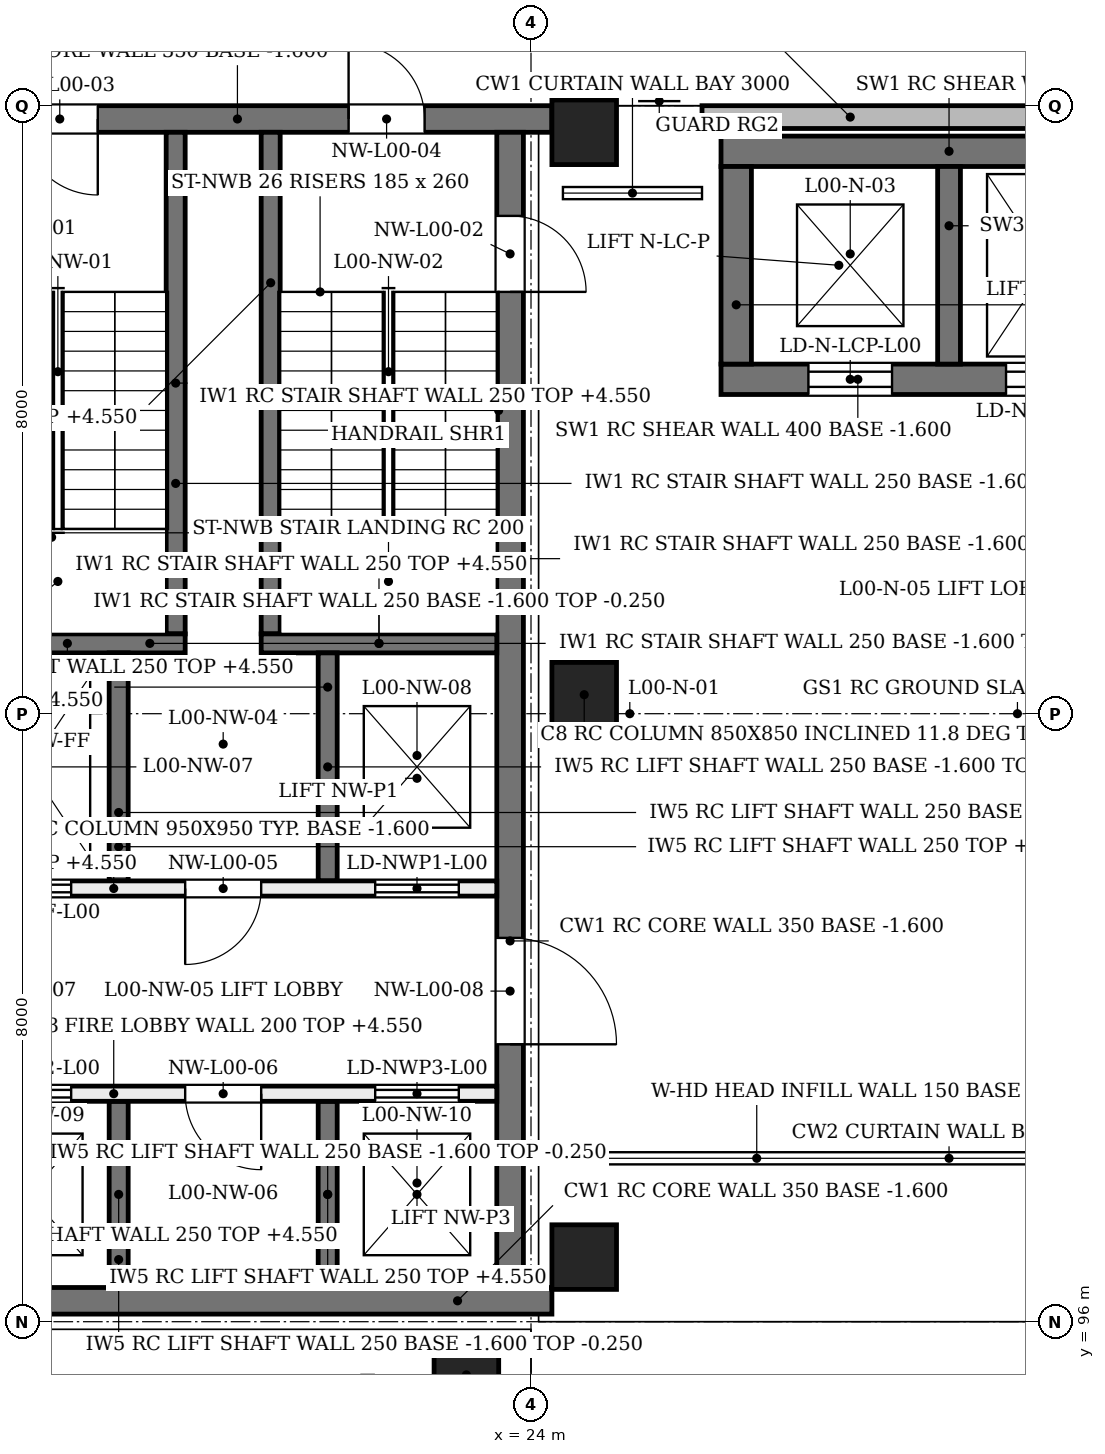
"""IFC4 building model, lengths in metres.
Left out: names, types, materials, properties, quantities, classifications, styles, units other than length and angle.
Written with IfcOpenShell. Run it as: python <this file> out.ifc"""

import sys

from ifc_helpers import new_model, si_unit, direction, frame, frame_2d, origin, origin_2d, place, context, subcontext, project, spatial, rectangle, extrude, element, fill, save


model = new_model("IFC4")
c1 = context("Model", 3, precision=1e-05, world=origin(), true_north=direction((0.0, 1.0)))
c2 = subcontext(c1, "Body", "Model", "MODEL_VIEW")
j1 = project(units=[si_unit("LENGTHUNIT", "METRE"), si_unit("PLANEANGLEUNIT", "RADIAN")], contexts=[c1])
p1 = place(None, origin())
s1 = spatial("IfcSite", under=j1, at=p1, CompositionType="ELEMENT")
p2 = place(p1, origin())
s2 = spatial("IfcBuilding", under=s1, at=p2, CompositionType="ELEMENT")
p3 = place(p2, origin())
s3 = spatial("IfcBuildingStorey", under=s2, at=p3, CompositionType="ELEMENT", Elevation=0.0)
p4 = place(p3, frame((26.5, 108.4, -1.6), z_axis=(0.0, 0.0, 1.0), x_axis=(1.0, 0.0, 0.0)))
e1 = element("IfcWall", 1, at=p4, inside=s3, PredefinedType="SHEAR", context=c2, shape_type="SweptSolid", body=[
    extrude(rectangle(XDim=6.0, YDim=0.4, at=frame_2d((3.0, 0.0))), origin(), (0.0, 0.0, 1.0), 6.18),
])
p5 = place(p4, frame((1.15, 0.0, 1.6)))
e2 = element("IfcOpeningElement", 2, at=p5, cuts=e1, PredefinedType="OPENING", context=c2, shape_type="SweptSolid", body=[
    extrude(rectangle(XDim=1.1, YDim=2.1, at=frame_2d((0.55, 1.05))), frame((0.0, 0.21, 0.0), z_axis=(0.0, -1.0, 0.0), x_axis=(1.0, 0.0, 0.0)), (0.0, 0.0, 1.0), 0.42),
])
p6 = place(p4, frame((3.75, 0.0, 1.6)))
e3 = element("IfcOpeningElement", 3, at=p6, cuts=e1, PredefinedType="OPENING", context=c2, shape_type="SweptSolid", body=[
    extrude(rectangle(XDim=1.1, YDim=2.1, at=frame_2d((0.55, 1.05))), frame((0.0, 0.21, 0.0), z_axis=(0.0, -1.0, 0.0), x_axis=(1.0, 0.0, 0.0)), (0.0, 0.0, 1.0), 0.42),
])
p7 = place(p3, frame((26.5, 111.4, -1.6), z_axis=(0.0, 0.0, 1.0), x_axis=(1.0, 0.0, 0.0)))
e4 = element("IfcWall", 4, at=p7, inside=s3, PredefinedType="SHEAR", context=c2, shape_type="SweptSolid", body=[
    extrude(rectangle(XDim=6.0, YDim=0.4, at=frame_2d((3.0, 0.0))), origin(), (0.0, 0.0, 1.0), 6.18),
])
p8 = place(p3, frame((26.7, 108.6, -1.6), z_axis=(0.0, 0.0, 1.0), x_axis=(0.0, 1.0, 0.0)))
e5 = element("IfcWall", 5, at=p8, inside=s3, PredefinedType="SHEAR", context=c2, shape_type="SweptSolid", body=[
    extrude(rectangle(XDim=2.6, YDim=0.4, at=frame_2d((1.3, 0.0))), origin(), (0.0, 0.0, 1.0), 6.18),
])
p9 = place(p3, frame((29.5, 108.6, -1.6), z_axis=(0.0, 0.0, 1.0), x_axis=(0.0, 1.0, 0.0)))
e6 = element("IfcWall", 6, at=p9, inside=s3, PredefinedType="SHEAR", context=c2, shape_type="SweptSolid", body=[
    extrude(rectangle(XDim=2.6, YDim=0.3, at=frame_2d((1.3, 0.0))), origin(), (0.0, 0.0, 1.0), 6.18),
])
p10 = place(p3, frame((16.0, 96.275, -1.6), z_axis=(0.0, 0.0, 1.0), x_axis=(1.0, 0.0, 0.0)))
e7 = element("IfcWall", 7, at=p10, inside=s3, PredefinedType="SHEAR", context=c2, shape_type="SweptSolid", body=[
    extrude(rectangle(XDim=8.275, YDim=0.35, at=frame_2d((4.137, 0.0))), origin(), (0.0, 0.0, 1.0), 6.18),
])
p11 = place(p3, frame((16.0, 111.825, -1.6), z_axis=(0.0, 0.0, 1.0), x_axis=(1.0, 0.0, 0.0)))
e8 = element("IfcWall", 8, at=p11, inside=s3, PredefinedType="SHEAR", context=c2, shape_type="SweptSolid", body=[
    extrude(rectangle(XDim=8.275, YDim=0.35, at=frame_2d((4.137, 0.0))), origin(), (0.0, 0.0, 1.0), 6.18),
])
p12 = place(p11, frame((1.3, 0.0, 1.6)))
e9 = element("IfcOpeningElement", 9, at=p12, cuts=e8, PredefinedType="OPENING", context=c2, shape_type="SweptSolid", body=[
    extrude(rectangle(XDim=1.0, YDim=2.1, at=frame_2d((0.5, 1.05))), frame((0.0, 0.185, 0.0), z_axis=(0.0, -1.0, 0.0), x_axis=(1.0, 0.0, 0.0)), (0.0, 0.0, 1.0), 0.37),
])
p13 = place(p11, frame((5.6, 0.0, 1.6)))
e10 = element("IfcOpeningElement", 10, at=p13, cuts=e8, PredefinedType="OPENING", context=c2, shape_type="SweptSolid", body=[
    extrude(rectangle(XDim=1.0, YDim=2.1, at=frame_2d((0.5, 1.05))), frame((0.0, 0.185, 0.0), z_axis=(0.0, -1.0, 0.0), x_axis=(1.0, 0.0, 0.0)), (0.0, 0.0, 1.0), 0.37),
])
p14 = place(p3, frame((23.725, 96.45, -1.6), z_axis=(0.0, 0.0, 1.0), x_axis=(0.0, 1.0, 0.0)))
e11 = element("IfcWall", 11, at=p14, inside=s3, PredefinedType="SHEAR", context=c2, shape_type="SweptSolid", body=[
    extrude(rectangle(XDim=15.2, YDim=0.35, at=frame_2d((7.6, 0.0))), origin(), (0.0, 0.0, 1.0), 6.18),
])
p15 = place(p14, frame((13.1, 0.0, 1.6)))
e12 = element("IfcOpeningElement", 12, at=p15, cuts=e11, PredefinedType="OPENING", context=c2, shape_type="SweptSolid", body=[
    extrude(rectangle(XDim=1.0, YDim=2.1, at=frame_2d((0.5, 1.05))), frame((0.0, 0.185, 0.0), z_axis=(0.0, -1.0, 0.0), x_axis=(1.0, 0.0, 0.0)), (0.0, 0.0, 1.0), 0.37),
])
p16 = place(p14, frame((3.2, 0.0, 1.6)))
e13 = element("IfcOpeningElement", 13, at=p16, cuts=e11, PredefinedType="OPENING", context=c2, shape_type="SweptSolid", body=[
    extrude(rectangle(XDim=1.4, YDim=2.1, at=frame_2d((0.7, 1.05))), frame((0.0, 0.185, 0.0), z_axis=(0.0, -1.0, 0.0), x_axis=(1.0, 0.0, 0.0)), (0.0, 0.0, 1.0), 0.37),
])
for number, where, z_axis, x_axis in (
    (14, (24.7, 96.267, -1.6), (0.0, 0.204, 0.979), (-1.0, 0.0, 0.0)),
    (15, (24.7, 103.667, -1.6), (0.0, 0.204, 0.979), (-1.0, 0.0, 0.0)),
    (16, (24.7, 111.067, -1.6), (0.0, 0.204, 0.979), (-1.0, 0.0, 0.0)),
    (17, (23.733, 95.3, -1.6), (-0.204, 0.0, 0.979), (0.0, -1.0, 0.0)),
):
    element("IfcColumn", number, at=place(p3, frame(where, z_axis=z_axis, x_axis=x_axis)), inside=s3, PredefinedType="COLUMN", context=c2, shape_type="SweptSolid", body=[
        extrude(rectangle(XDim=0.85, YDim=0.85, at=origin_2d()), origin(), (0.0, 0.0, 1.0), 6.538),
    ])
p17 = place(p3, frame((26.25, 111.85, 0.0), z_axis=(0.0, 0.0, 1.0), x_axis=(1.0, 0.0, 0.0)))
e18 = element("IfcWall", 18, at=p17, inside=s3, PredefinedType="SOLIDWALL", context=c2, shape_type="SweptSolid", body=[
    extrude(rectangle(XDim=6.5, YDim=0.3, at=frame_2d((3.25, 0.0))), origin(), (0.0, 0.0, 1.0), 3.9),
])
p18 = place(p3, frame((24.9, 98.15, 4.1), z_axis=(0.0, 0.0, 1.0), x_axis=(1.0, 0.0, 0.0)))
e19 = element("IfcWall", 19, at=p18, inside=s3, PredefinedType="SOLIDWALL", context=c2, shape_type="SweptSolid", body=[
    extrude(rectangle(XDim=6.9, YDim=0.15, at=frame_2d((3.45, 0.0))), origin(), (0.0, 0.0, 1.0), 0.48),
])
p19 = place(p3, frame((19.325, 111.65, 0.0), z_axis=(0.0, 0.0, 1.0), x_axis=(0.0, -1.0, 0.0)))
e20 = element("IfcWall", 20, at=p19, inside=s3, PredefinedType="SOLIDWALL", context=c2, shape_type="SweptSolid", body=[
    extrude(rectangle(XDim=6.6, YDim=0.25, at=frame_2d((3.3, 0.0))), origin(), (0.0, 0.0, 1.0), 4.55),
])
p20 = place(p3, frame((19.325, 111.65, -1.6), z_axis=(0.0, 0.0, 1.0), x_axis=(0.0, -1.0, 0.0)))
e21 = element("IfcWall", 21, at=p20, inside=s3, PredefinedType="SOLIDWALL", context=c2, shape_type="SweptSolid", body=[
    extrude(rectangle(XDim=6.6, YDim=0.25, at=frame_2d((3.3, 0.0))), origin(), (0.0, 0.0, 1.0), 1.35),
])
p21 = place(p3, frame((20.575, 111.65, 0.0), z_axis=(0.0, 0.0, 1.0), x_axis=(0.0, -1.0, 0.0)))
e22 = element("IfcWall", 22, at=p21, inside=s3, PredefinedType="SOLIDWALL", context=c2, shape_type="SweptSolid", body=[
    extrude(rectangle(XDim=6.6, YDim=0.25, at=frame_2d((3.3, 0.0))), origin(), (0.0, 0.0, 1.0), 4.55),
])
p22 = place(p3, frame((20.575, 111.65, -1.6), z_axis=(0.0, 0.0, 1.0), x_axis=(0.0, -1.0, 0.0)))
e23 = element("IfcWall", 23, at=p22, inside=s3, PredefinedType="SOLIDWALL", context=c2, shape_type="SweptSolid", body=[
    extrude(rectangle(XDim=6.6, YDim=0.25, at=frame_2d((3.3, 0.0))), origin(), (0.0, 0.0, 1.0), 1.35),
])
p23 = place(p3, frame((16.35, 104.925, 0.0), z_axis=(0.0, 0.0, 1.0), x_axis=(1.0, 0.0, 0.0)))
e24 = element("IfcWall", 24, at=p23, inside=s3, PredefinedType="SOLIDWALL", context=c2, shape_type="SweptSolid", body=[
    extrude(rectangle(XDim=3.1, YDim=0.25, at=frame_2d((1.55, 0.0))), origin(), (0.0, 0.0, 1.0), 4.55),
])
p24 = place(p3, frame((16.35, 104.925, -1.6), z_axis=(0.0, 0.0, 1.0), x_axis=(1.0, 0.0, 0.0)))
e25 = element("IfcWall", 25, at=p24, inside=s3, PredefinedType="SOLIDWALL", context=c2, shape_type="SweptSolid", body=[
    extrude(rectangle(XDim=3.1, YDim=0.25, at=frame_2d((1.55, 0.0))), origin(), (0.0, 0.0, 1.0), 1.35),
])
p25 = place(p3, frame((20.45, 104.925, 0.0), z_axis=(0.0, 0.0, 1.0), x_axis=(1.0, 0.0, 0.0)))
e26 = element("IfcWall", 26, at=p25, inside=s3, PredefinedType="SOLIDWALL", context=c2, shape_type="SweptSolid", body=[
    extrude(rectangle(XDim=3.1, YDim=0.25, at=frame_2d((1.55, 0.0))), origin(), (0.0, 0.0, 1.0), 4.55),
])
p26 = place(p3, frame((20.45, 104.925, -1.6), z_axis=(0.0, 0.0, 1.0), x_axis=(1.0, 0.0, 0.0)))
e27 = element("IfcWall", 27, at=p26, inside=s3, PredefinedType="SOLIDWALL", context=c2, shape_type="SweptSolid", body=[
    extrude(rectangle(XDim=3.1, YDim=0.25, at=frame_2d((1.55, 0.0))), origin(), (0.0, 0.0, 1.0), 1.35),
])
p27 = place(p3, frame((18.575, 104.8, 0.0), z_axis=(0.0, 0.0, 1.0), x_axis=(0.0, -1.0, 0.0)))
e28 = element("IfcWall", 28, at=p27, inside=s3, PredefinedType="SOLIDWALL", context=c2, shape_type="SweptSolid", body=[
    extrude(rectangle(XDim=3.0, YDim=0.25, at=frame_2d((1.5, 0.0))), origin(), (0.0, 0.0, 1.0), 4.55),
])
p28 = place(p3, frame((18.575, 104.8, -1.6), z_axis=(0.0, 0.0, 1.0), x_axis=(0.0, -1.0, 0.0)))
e29 = element("IfcWall", 29, at=p28, inside=s3, PredefinedType="SOLIDWALL", context=c2, shape_type="SweptSolid", body=[
    extrude(rectangle(XDim=3.0, YDim=0.25, at=frame_2d((1.5, 0.0))), origin(), (0.0, 0.0, 1.0), 1.35),
])
p29 = place(p3, frame((18.575, 98.9, 0.0), z_axis=(0.0, 0.0, 1.0), x_axis=(0.0, -1.0, 0.0)))
e30 = element("IfcWall", 30, at=p29, inside=s3, PredefinedType="SOLIDWALL", context=c2, shape_type="SweptSolid", body=[
    extrude(rectangle(XDim=2.45, YDim=0.25, at=frame_2d((1.225, 0.0))), origin(), (0.0, 0.0, 1.0), 4.55),
])
p30 = place(p3, frame((18.575, 98.9, -1.6), z_axis=(0.0, 0.0, 1.0), x_axis=(0.0, -1.0, 0.0)))
e31 = element("IfcWall", 31, at=p30, inside=s3, PredefinedType="SOLIDWALL", context=c2, shape_type="SweptSolid", body=[
    extrude(rectangle(XDim=2.45, YDim=0.25, at=frame_2d((1.225, 0.0))), origin(), (0.0, 0.0, 1.0), 1.35),
])
p31 = place(p3, frame((21.325, 104.8, 0.0), z_axis=(0.0, 0.0, 1.0), x_axis=(0.0, -1.0, 0.0)))
e32 = element("IfcWall", 32, at=p31, inside=s3, PredefinedType="SOLIDWALL", context=c2, shape_type="SweptSolid", body=[
    extrude(rectangle(XDim=3.0, YDim=0.25, at=frame_2d((1.5, 0.0))), origin(), (0.0, 0.0, 1.0), 4.55),
])
p32 = place(p3, frame((21.325, 104.8, -1.6), z_axis=(0.0, 0.0, 1.0), x_axis=(0.0, -1.0, 0.0)))
e33 = element("IfcWall", 33, at=p32, inside=s3, PredefinedType="SOLIDWALL", context=c2, shape_type="SweptSolid", body=[
    extrude(rectangle(XDim=3.0, YDim=0.25, at=frame_2d((1.5, 0.0))), origin(), (0.0, 0.0, 1.0), 1.35),
])
p33 = place(p3, frame((21.325, 98.9, 0.0), z_axis=(0.0, 0.0, 1.0), x_axis=(0.0, -1.0, 0.0)))
e34 = element("IfcWall", 34, at=p33, inside=s3, PredefinedType="SOLIDWALL", context=c2, shape_type="SweptSolid", body=[
    extrude(rectangle(XDim=2.45, YDim=0.25, at=frame_2d((1.225, 0.0))), origin(), (0.0, 0.0, 1.0), 4.55),
])
p34 = place(p3, frame((21.325, 98.9, -1.6), z_axis=(0.0, 0.0, 1.0), x_axis=(0.0, -1.0, 0.0)))
e35 = element("IfcWall", 35, at=p34, inside=s3, PredefinedType="SOLIDWALL", context=c2, shape_type="SweptSolid", body=[
    extrude(rectangle(XDim=2.45, YDim=0.25, at=frame_2d((1.225, 0.0))), origin(), (0.0, 0.0, 1.0), 1.35),
])
p35 = place(p3, frame((16.35, 101.7, 0.0), z_axis=(0.0, 0.0, 1.0), x_axis=(1.0, 0.0, 0.0)))
e36 = element("IfcWall", 36, at=p35, inside=s3, PredefinedType="SOLIDWALL", context=c2, shape_type="SweptSolid", body=[
    extrude(rectangle(XDim=7.2, YDim=0.2, at=frame_2d((3.6, 0.0))), origin(), (0.0, 0.0, 1.0), 4.55),
])
p36 = place(p35, frame((0.5, 0.0, 0.0)))
e37 = element("IfcOpeningElement", 37, at=p36, cuts=e36, PredefinedType="OPENING", context=c2, shape_type="SweptSolid", body=[
    extrude(rectangle(XDim=1.1, YDim=2.1, at=frame_2d((0.55, 1.05))), frame((0.0, 0.11, 0.0), z_axis=(0.0, -1.0, 0.0), x_axis=(1.0, 0.0, 0.0)), (0.0, 0.0, 1.0), 0.22),
])
p37 = place(p35, frame((5.6, 0.0, 0.0)))
e38 = element("IfcOpeningElement", 38, at=p37, cuts=e36, PredefinedType="OPENING", context=c2, shape_type="SweptSolid", body=[
    extrude(rectangle(XDim=1.1, YDim=2.1, at=frame_2d((0.55, 1.05))), frame((0.0, 0.11, 0.0), z_axis=(0.0, -1.0, 0.0), x_axis=(1.0, 0.0, 0.0)), (0.0, 0.0, 1.0), 0.22),
])
p38 = place(p35, frame((3.1, 0.0, 0.0)))
e39 = element("IfcOpeningElement", 39, at=p38, cuts=e36, PredefinedType="OPENING", context=c2, shape_type="SweptSolid", body=[
    extrude(rectangle(XDim=1.0, YDim=2.1, at=frame_2d((0.5, 1.05))), frame((0.0, 0.11, 0.0), z_axis=(0.0, -1.0, 0.0), x_axis=(1.0, 0.0, 0.0)), (0.0, 0.0, 1.0), 0.22),
])
p39 = place(p3, frame((16.35, 99.0, 0.0), z_axis=(0.0, 0.0, 1.0), x_axis=(1.0, 0.0, 0.0)))
e40 = element("IfcWall", 40, at=p39, inside=s3, PredefinedType="SOLIDWALL", context=c2, shape_type="SweptSolid", body=[
    extrude(rectangle(XDim=7.2, YDim=0.2, at=frame_2d((3.6, 0.0))), origin(), (0.0, 0.0, 1.0), 4.55),
])
p40 = place(p39, frame((0.5, 0.0, 0.0)))
e41 = element("IfcOpeningElement", 41, at=p40, cuts=e40, PredefinedType="OPENING", context=c2, shape_type="SweptSolid", body=[
    extrude(rectangle(XDim=1.1, YDim=2.1, at=frame_2d((0.55, 1.05))), frame((0.0, 0.11, 0.0), z_axis=(0.0, -1.0, 0.0), x_axis=(1.0, 0.0, 0.0)), (0.0, 0.0, 1.0), 0.22),
])
p41 = place(p39, frame((5.6, 0.0, 0.0)))
e42 = element("IfcOpeningElement", 42, at=p41, cuts=e40, PredefinedType="OPENING", context=c2, shape_type="SweptSolid", body=[
    extrude(rectangle(XDim=1.1, YDim=2.1, at=frame_2d((0.55, 1.05))), frame((0.0, 0.11, 0.0), z_axis=(0.0, -1.0, 0.0), x_axis=(1.0, 0.0, 0.0)), (0.0, 0.0, 1.0), 0.22),
])
p42 = place(p39, frame((3.1, 0.0, 0.0)))
e43 = element("IfcOpeningElement", 43, at=p42, cuts=e40, PredefinedType="OPENING", context=c2, shape_type="SweptSolid", body=[
    extrude(rectangle(XDim=1.0, YDim=2.1, at=frame_2d((0.5, 1.05))), frame((0.0, 0.11, 0.0), z_axis=(0.0, -1.0, 0.0), x_axis=(1.0, 0.0, 0.0)), (0.0, 0.0, 1.0), 0.22),
])
p43 = place(p15, frame((1.0, 0.0, 0.0), z_axis=(0.0, 0.0, 1.0), x_axis=(-1.0, 0.0, 0.0)))
e44 = element("IfcDoor", 44, at=p43, inside=s3, OperationType="SINGLE_SWING_LEFT", PredefinedType="DOOR", context=c2, shape_type="SweptSolid", body=[
    extrude(rectangle(XDim=1.0, YDim=2.1, at=frame_2d((0.5, 1.05))), frame((0.0, 0.025, 0.0), z_axis=(0.0, -1.0, 0.0), x_axis=(1.0, 0.0, 0.0)), (0.0, 0.0, 1.0), 0.05),
])
fill(e12, e44)
p44 = place(p12, origin())
e45 = element("IfcDoor", 45, at=p44, inside=s3, OperationType="SINGLE_SWING_RIGHT", PredefinedType="DOOR", context=c2, shape_type="SweptSolid", body=[
    extrude(rectangle(XDim=1.0, YDim=2.1, at=frame_2d((0.5, 1.05))), frame((0.0, 0.025, 0.0), z_axis=(0.0, -1.0, 0.0), x_axis=(1.0, 0.0, 0.0)), (0.0, 0.0, 1.0), 0.05),
])
fill(e9, e45)
p45 = place(p13, origin())
e46 = element("IfcDoor", 46, at=p45, inside=s3, OperationType="SINGLE_SWING_LEFT", PredefinedType="DOOR", context=c2, shape_type="SweptSolid", body=[
    extrude(rectangle(XDim=1.0, YDim=2.1, at=frame_2d((0.5, 1.05))), frame((0.0, 0.025, 0.0), z_axis=(0.0, -1.0, 0.0), x_axis=(1.0, 0.0, 0.0)), (0.0, 0.0, 1.0), 0.05),
])
fill(e10, e46)
p46 = place(p36, frame((1.1, 0.0, 0.0), z_axis=(0.0, 0.0, 1.0), x_axis=(-1.0, 0.0, 0.0)))
e47 = element("IfcDoor", 47, at=p46, inside=s3, OperationType="DOUBLE_DOOR_SLIDING", PredefinedType="DOOR", context=c2, shape_type="SweptSolid", body=[
    extrude(rectangle(XDim=1.1, YDim=2.1, at=frame_2d((0.55, 1.05))), frame((0.0, 0.025, 0.0), z_axis=(0.0, -1.0, 0.0), x_axis=(1.0, 0.0, 0.0)), (0.0, 0.0, 1.0), 0.05),
])
fill(e37, e47)
p47 = place(p37, frame((1.1, 0.0, 0.0), z_axis=(0.0, 0.0, 1.0), x_axis=(-1.0, 0.0, 0.0)))
e48 = element("IfcDoor", 48, at=p47, inside=s3, OperationType="DOUBLE_DOOR_SLIDING", PredefinedType="DOOR", context=c2, shape_type="SweptSolid", body=[
    extrude(rectangle(XDim=1.1, YDim=2.1, at=frame_2d((0.55, 1.05))), frame((0.0, 0.025, 0.0), z_axis=(0.0, -1.0, 0.0), x_axis=(1.0, 0.0, 0.0)), (0.0, 0.0, 1.0), 0.05),
])
fill(e38, e48)
p48 = place(p40, origin())
e49 = element("IfcDoor", 49, at=p48, inside=s3, OperationType="DOUBLE_DOOR_SLIDING", PredefinedType="DOOR", context=c2, shape_type="SweptSolid", body=[
    extrude(rectangle(XDim=1.1, YDim=2.1, at=frame_2d((0.55, 1.05))), frame((0.0, 0.025, 0.0), z_axis=(0.0, -1.0, 0.0), x_axis=(1.0, 0.0, 0.0)), (0.0, 0.0, 1.0), 0.05),
])
fill(e41, e49)
p49 = place(p41, origin())
e50 = element("IfcDoor", 50, at=p49, inside=s3, OperationType="DOUBLE_DOOR_SLIDING", PredefinedType="DOOR", context=c2, shape_type="SweptSolid", body=[
    extrude(rectangle(XDim=1.1, YDim=2.1, at=frame_2d((0.55, 1.05))), frame((0.0, 0.025, 0.0), z_axis=(0.0, -1.0, 0.0), x_axis=(1.0, 0.0, 0.0)), (0.0, 0.0, 1.0), 0.05),
])
fill(e42, e50)
p50 = place(p38, frame((1.0, 0.0, 0.0), z_axis=(0.0, 0.0, 1.0), x_axis=(-1.0, 0.0, 0.0)))
e51 = element("IfcDoor", 51, at=p50, inside=s3, OperationType="SINGLE_SWING_LEFT", PredefinedType="DOOR", context=c2, shape_type="SweptSolid", body=[
    extrude(rectangle(XDim=1.0, YDim=2.1, at=frame_2d((0.5, 1.05))), frame((0.0, 0.025, 0.0), z_axis=(0.0, -1.0, 0.0), x_axis=(1.0, 0.0, 0.0)), (0.0, 0.0, 1.0), 0.05),
])
fill(e39, e51)
p51 = place(p42, origin())
e52 = element("IfcDoor", 52, at=p51, inside=s3, OperationType="SINGLE_SWING_RIGHT", PredefinedType="DOOR", context=c2, shape_type="SweptSolid", body=[
    extrude(rectangle(XDim=1.0, YDim=2.1, at=frame_2d((0.5, 1.05))), frame((0.0, 0.025, 0.0), z_axis=(0.0, -1.0, 0.0), x_axis=(1.0, 0.0, 0.0)), (0.0, 0.0, 1.0), 0.05),
])
fill(e43, e52)
p52 = place(p16, frame((1.4, 0.0, 0.0), z_axis=(0.0, 0.0, 1.0), x_axis=(-1.0, 0.0, 0.0)))
e53 = element("IfcDoor", 53, at=p52, inside=s3, OperationType="SINGLE_SWING_LEFT", PredefinedType="DOOR", context=c2, shape_type="SweptSolid", body=[
    extrude(rectangle(XDim=1.4, YDim=2.1, at=frame_2d((0.7, 1.05))), frame((0.0, 0.025, 0.0), z_axis=(0.0, -1.0, 0.0), x_axis=(1.0, 0.0, 0.0)), (0.0, 0.0, 1.0), 0.05),
])
fill(e13, e53)
p53 = place(p5, frame((1.1, 0.0, 0.0), z_axis=(0.0, 0.0, 1.0), x_axis=(-1.0, 0.0, 0.0)))
e54 = element("IfcDoor", 54, at=p53, inside=s3, OperationType="DOUBLE_DOOR_SLIDING", PredefinedType="DOOR", context=c2, shape_type="SweptSolid", body=[
    extrude(rectangle(XDim=1.1, YDim=2.1, at=frame_2d((0.55, 1.05))), frame((0.0, 0.025, 0.0), z_axis=(0.0, -1.0, 0.0), x_axis=(1.0, 0.0, 0.0)), (0.0, 0.0, 1.0), 0.05),
])
fill(e2, e54)
p54 = place(p6, frame((1.1, 0.0, 0.0), z_axis=(0.0, 0.0, 1.0), x_axis=(-1.0, 0.0, 0.0)))
e55 = element("IfcDoor", 55, at=p54, inside=s3, OperationType="DOUBLE_DOOR_SLIDING", PredefinedType="DOOR", context=c2, shape_type="SweptSolid", body=[
    extrude(rectangle(XDim=1.1, YDim=2.1, at=frame_2d((0.55, 1.05))), frame((0.0, 0.025, 0.0), z_axis=(0.0, -1.0, 0.0), x_axis=(1.0, 0.0, 0.0)), (0.0, 0.0, 1.0), 0.05),
])
fill(e3, e55)
save(model, sys.argv[1])
